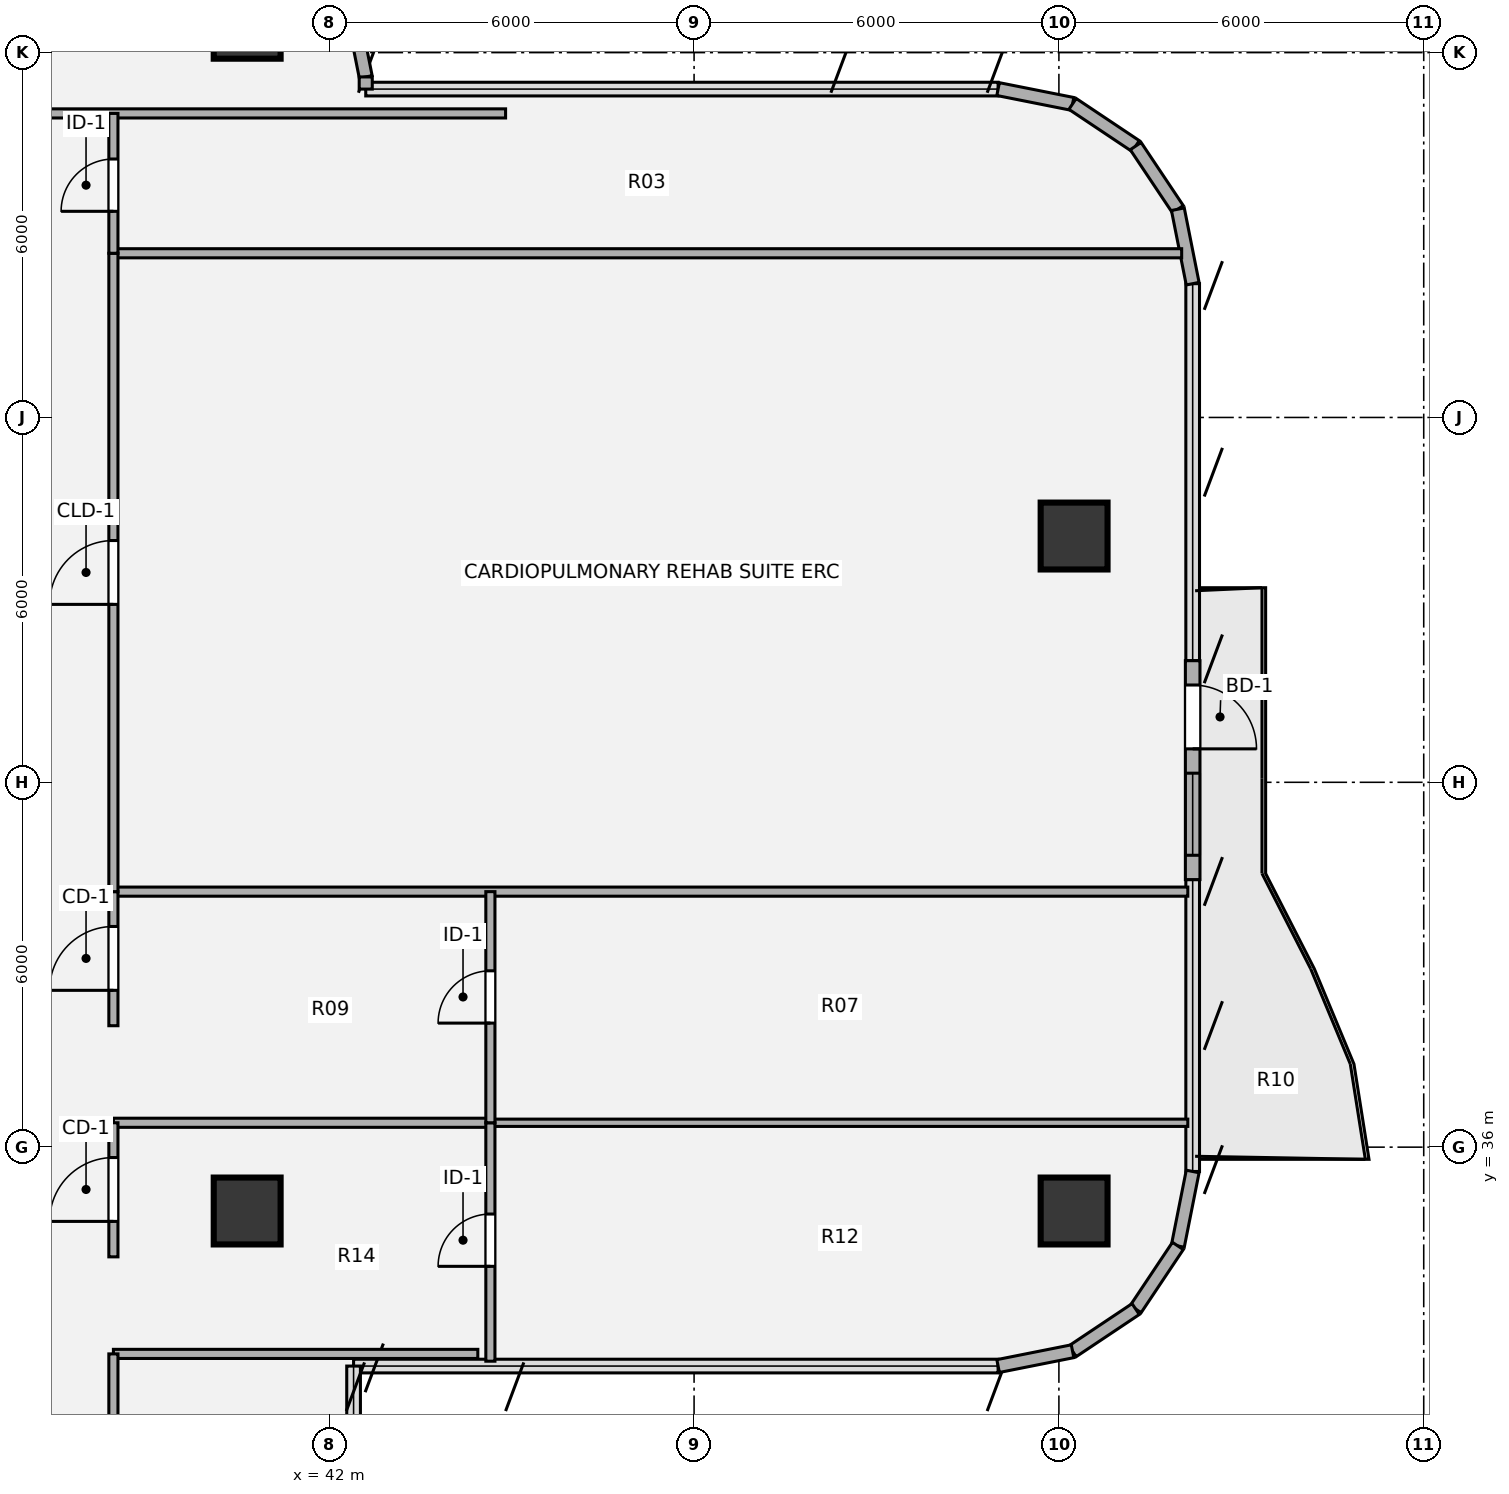
"""IFC4 building model, lengths in metres.
Left out: names, types, materials, properties, quantities, classifications, styles, units other than length and angle.
Written with IfcOpenShell. Run it as: python <this file> out.ifc"""

import sys

from ifc_helpers import new_model, si_unit, direction, frame, frame_2d, origin, origin_2d, place, context, subcontext, project, spatial, rectangle, hollow_circle, extrude, source, transform, mapped, element, fill, save


model = new_model("IFC4")
c1 = context("Model", 3, precision=1e-05, world=origin(), true_north=direction((0.0, 1.0)))
c2 = subcontext(c1, "Body", "Model", "MODEL_VIEW")
j1 = project(units=[si_unit("LENGTHUNIT", "METRE"), si_unit("PLANEANGLEUNIT", "RADIAN")], contexts=[c1])
p1 = place(None, origin())
s1 = spatial("IfcSite", under=j1, at=p1, CompositionType="ELEMENT")
p2 = place(p1, origin())
s2 = spatial("IfcBuilding", under=s1, at=p2, CompositionType="ELEMENT")
p3 = place(p2, frame((0.0, 0.0, 182.88)))
s3 = spatial("IfcBuildingStorey", under=s2, at=p3, CompositionType="ELEMENT", Elevation=182.88)
m1 = source(origin(), c2, "Body", "SweptSolid", [
    extrude(hollow_circle(Radius=0.55, WallThickness=0.04, at=origin_2d()), origin(), (0.0, 0.0, 1.0), 3.78),
])
for number, where, z_axis, x_axis in (
    (1, (54.25, 34.95, 0.0), (0.0, 0.0, 1.0), (1.0, 0.0, 0.0)),
    (2, (54.25, 46.05, 0.0), (0.0, 0.0, 1.0), (1.0, 0.0, 0.0)),
    (3, (40.65, 34.95, 0.0), (0.0, 0.0, 1.0), (1.0, 0.0, 0.0)),
    (4, (40.65, 54.45, 0.0), (0.0, 0.0, 1.0), (1.0, 0.0, 0.0)),
):
    element("IfcColumn", number, at=place(p3, frame(where, z_axis=z_axis, x_axis=x_axis)), inside=s3, PredefinedType="COLUMN", context=c2, shape_type="MappedRepresentation", body=[
        mapped(m1, transform((0.0, 0.0, 0.0), x_axis=(1.0, 0.0, 0.0), y_axis=(0.0, 1.0, 0.0), z_axis=(0.0, 0.0, 1.0), scale=1.0)),
    ])
p4 = place(p3, frame((42.387, 54.671, 0.0), z_axis=(0.0, 0.0, 1.0), x_axis=(0.195127417394, -0.980777900945, 0.0)))
e5 = element("IfcWall", 5, at=p4, inside=s3, PredefinedType="SOLIDWALL", context=c2, shape_type="SweptSolid", body=[
    extrude(rectangle(XDim=1.092, YDim=0.215, at=frame_2d((0.546, 0.0))), origin(), (0.0, 0.0, 1.0), 3.53),
])
p5 = place(p3, frame((42.6, 53.6, 0.0), z_axis=(0.0, 0.0, 1.0), x_axis=(0.0, -1.0, 0.0)))
e6 = element("IfcWall", 6, at=p5, inside=s3, PredefinedType="SOLIDWALL", context=c2, shape_type="SweptSolid", body=[
    extrude(rectangle(XDim=0.2, YDim=0.215, at=frame_2d((0.1, 0.0))), origin(), (0.0, 0.0, 1.0), 3.53),
])
for number, where, z_axis, x_axis in (
    (7, (53.0, 53.4, 0.0), (0.0, 0.0, 1.0), (0.981, -0.195, 0.0)),
    (8, (54.225, 53.156, 0.0), (0.0, 0.0, 1.0), (0.831, -0.556, 0.0)),
    (9, (55.263, 52.463, 0.0), (0.0, 0.0, 1.0), (0.556, -0.831, 0.0)),
    (10, (55.956, 51.425, 0.0), (0.0, 0.0, 1.0), (0.195, -0.981, 0.0)),
):
    element("IfcWall", number, at=place(p3, frame(where, z_axis=z_axis, x_axis=x_axis)), inside=s3, PredefinedType="SOLIDWALL", context=c2, shape_type="SweptSolid", body=[
        extrude(rectangle(XDim=1.249, YDim=0.215, at=frame_2d((0.624, 0.0))), origin(), (0.0, 0.0, 1.0), 3.53),
    ])
p6 = place(p3, frame((56.2, 44.0, 0.0), z_axis=(0.0, 0.0, 1.0), x_axis=(0.0, -1.0, 0.0)))
e11 = element("IfcWall", 11, at=p6, inside=s3, PredefinedType="SOLIDWALL", context=c2, shape_type="SweptSolid", body=[
    extrude(rectangle(XDim=3.6, YDim=0.24, at=frame_2d((1.8, 0.0))), origin(), (0.0, 0.0, 1.0), 3.53),
])
p7 = place(p6, frame((0.4, 0.0, 0.0)))
e12 = element("IfcOpeningElement", 12, at=p7, cuts=e11, PredefinedType="OPENING", context=c2, shape_type="SweptSolid", body=[
    extrude(rectangle(XDim=1.05, YDim=2.15, at=origin_2d()), frame((0.525, 0.13, 1.075), z_axis=(0.0, -1.0, 0.0), x_axis=(1.0, 0.0, 0.0)), (0.0, 0.0, 1.0), 0.26),
])
p8 = place(p6, frame((1.85, 0.0, 0.85)))
e13 = element("IfcOpeningElement", 13, at=p8, cuts=e11, PredefinedType="OPENING", context=c2, shape_type="SweptSolid", body=[
    extrude(rectangle(XDim=1.35, YDim=1.35, at=origin_2d()), frame((0.675, 0.13, 0.675), z_axis=(0.0, -1.0, 0.0), x_axis=(1.0, 0.0, 0.0)), (0.0, 0.0, 1.0), 0.26),
])
for number, where, z_axis, x_axis in (
    (14, (56.2, 35.6, 0.0), (0.0, 0.0, 1.0), (-0.195, -0.981, 0.0)),
    (15, (55.956, 34.375, 0.0), (0.0, 0.0, 1.0), (-0.556, -0.831, 0.0)),
    (16, (55.263, 33.337, 0.0), (0.0, 0.0, 1.0), (-0.831, -0.556, 0.0)),
    (17, (54.225, 32.644, 0.0), (0.0, 0.0, 1.0), (-0.981, -0.195, 0.0)),
):
    element("IfcWall", number, at=place(p3, frame(where, z_axis=z_axis, x_axis=x_axis)), inside=s3, PredefinedType="SOLIDWALL", context=c2, shape_type="SweptSolid", body=[
        extrude(rectangle(XDim=1.249, YDim=0.215, at=frame_2d((0.624, 0.0))), origin(), (0.0, 0.0, 1.0), 3.53),
    ])
p9 = place(p3, frame((38.45, 32.6, 0.0), z_axis=(0.0, 0.0, 1.0), x_axis=(1.0, 0.0, 0.0)))
e18 = element("IfcWall", 18, at=p9, inside=s3, PredefinedType="PARTITIONING", context=c2, shape_type="SweptSolid", body=[
    extrude(rectangle(XDim=5.993, YDim=0.15, at=frame_2d((2.997, 0.0))), origin(), (0.0, 0.0, 1.0), 3.5),
])
p10 = place(p3, frame((38.45, 36.401, 0.0), z_axis=(0.0, 0.0, 1.0), x_axis=(1.0, 0.0, 0.0)))
e19 = element("IfcWall", 19, at=p10, inside=s3, PredefinedType="PARTITIONING", context=c2, shape_type="SweptSolid", body=[
    extrude(rectangle(XDim=6.2, YDim=0.15, at=frame_2d((3.1, 0.0))), origin(), (0.0, 0.0, 1.0), 2.982),
])
p11 = place(p3, frame((44.65, 36.401, 0.0), z_axis=(0.0, 0.0, 1.0), x_axis=(1.0, 0.0, 0.0)))
e20 = element("IfcWall", 20, at=p11, inside=s3, PredefinedType="PARTITIONING", context=c2, shape_type="SweptSolid", body=[
    extrude(rectangle(XDim=11.47, YDim=0.12, at=frame_2d((5.735, 0.0))), origin(), (0.0, 0.0, 1.0), 2.982),
])
p12 = place(p3, frame((38.45, 40.202, 0.0), z_axis=(0.0, 0.0, 1.0), x_axis=(1.0, 0.0, 0.0)))
e21 = element("IfcWall", 21, at=p12, inside=s3, PredefinedType="PARTITIONING", context=c2, shape_type="SweptSolid", body=[
    extrude(rectangle(XDim=17.67, YDim=0.15, at=frame_2d((8.835, 0.0))), origin(), (0.0, 0.0, 1.0), 2.982),
])
p13 = place(p3, frame((38.45, 50.7, 0.0), z_axis=(0.0, 0.0, 1.0), x_axis=(1.0, 0.0, 0.0)))
e22 = element("IfcWall", 22, at=p13, inside=s3, PredefinedType="PARTITIONING", context=c2, shape_type="SweptSolid", body=[
    extrude(rectangle(XDim=17.569, YDim=0.15, at=frame_2d((8.785, 0.0))), origin(), (0.0, 0.0, 1.0), 3.308),
])
p14 = place(p3, frame((27.1, 53.0, 0.0), z_axis=(0.0, 0.0, 1.0), x_axis=(1.0, 0.0, 0.0)))
e23 = element("IfcWall", 23, at=p14, inside=s3, PredefinedType="PARTITIONING", context=c2, shape_type="SweptSolid", body=[
    extrude(rectangle(XDim=17.8, YDim=0.15, at=frame_2d((8.9, 0.0))), origin(), (0.0, 0.0, 1.0), 3.308),
])
p15 = place(p14, frame((8.375, 0.0, 0.0)))
e24 = element("IfcOpeningElement", 24, at=p15, cuts=e23, PredefinedType="OPENING", context=c2, shape_type="SweptSolid", body=[
    extrude(rectangle(XDim=1.05, YDim=2.1, at=origin_2d()), frame((0.525, 0.085, 1.05), z_axis=(0.0, -1.0, 0.0), x_axis=(1.0, 0.0, 0.0)), (0.0, 0.0, 1.0), 0.17),
])
p16 = place(p3, frame((38.45, 22.4, 0.0), z_axis=(0.0, 0.0, 1.0), x_axis=(0.0, 1.0, 0.0)))
e25 = element("IfcWall", 25, at=p16, inside=s3, PredefinedType="PARTITIONING", context=c2, shape_type="SweptSolid", body=[
    extrude(rectangle(XDim=10.2, YDim=0.15, at=frame_2d((5.1, 0.0))), origin(), (0.0, 0.0, 1.0), 3.5),
])
p17 = place(p16, frame((4.475, 0.0, 0.0)))
e26 = element("IfcOpeningElement", 26, at=p17, cuts=e25, PredefinedType="OPENING", context=c2, shape_type="SweptSolid", body=[
    extrude(rectangle(XDim=1.05, YDim=2.1, at=origin_2d()), frame((0.525, 0.085, 1.05), z_axis=(0.0, -1.0, 0.0), x_axis=(1.0, 0.0, 0.0)), (0.0, 0.0, 1.0), 0.17),
])
p18 = place(p3, frame((38.45, 34.196, 0.0), z_axis=(0.0, 0.0, 1.0), x_axis=(0.0, 1.0, 0.0)))
e27 = element("IfcWall", 27, at=p18, inside=s3, PredefinedType="PARTITIONING", context=c2, shape_type="SweptSolid", body=[
    extrude(rectangle(XDim=2.205, YDim=0.15, at=frame_2d((1.103, 0.0))), origin(), (0.0, 0.0, 1.0), 3.5),
])
p19 = place(p18, frame((0.583, 0.0, 0.0)))
e28 = element("IfcOpeningElement", 28, at=p19, cuts=e27, PredefinedType="OPENING", context=c2, shape_type="SweptSolid", body=[
    extrude(rectangle(XDim=1.05, YDim=2.1, at=origin_2d()), frame((0.525, 0.085, 1.05), z_axis=(0.0, -1.0, 0.0), x_axis=(1.0, 0.0, 0.0)), (0.0, 0.0, 1.0), 0.17),
])
p20 = place(p3, frame((38.45, 37.997, 0.0), z_axis=(0.0, 0.0, 1.0), x_axis=(0.0, 1.0, 0.0)))
e29 = element("IfcWall", 29, at=p20, inside=s3, PredefinedType="PARTITIONING", context=c2, shape_type="SweptSolid", body=[
    extrude(rectangle(XDim=2.205, YDim=0.15, at=frame_2d((1.103, 0.0))), origin(), (0.0, 0.0, 1.0), 3.5),
])
p21 = place(p20, frame((0.582, 0.0, 0.0)))
e30 = element("IfcOpeningElement", 30, at=p21, cuts=e29, PredefinedType="OPENING", context=c2, shape_type="SweptSolid", body=[
    extrude(rectangle(XDim=1.05, YDim=2.1, at=origin_2d()), frame((0.525, 0.085, 1.05), z_axis=(0.0, -1.0, 0.0), x_axis=(1.0, 0.0, 0.0)), (0.0, 0.0, 1.0), 0.17),
])
p22 = place(p3, frame((38.45, 40.202, 0.0), z_axis=(0.0, 0.0, 1.0), x_axis=(0.0, 1.0, 0.0)))
e31 = element("IfcWall", 31, at=p22, inside=s3, PredefinedType="PARTITIONING", context=c2, shape_type="SweptSolid", body=[
    extrude(rectangle(XDim=10.498, YDim=0.15, at=frame_2d((5.249, 0.0))), origin(), (0.0, 0.0, 1.0), 3.5),
])
p23 = place(p22, frame((4.724, 0.0, 0.0)))
e32 = element("IfcOpeningElement", 32, at=p23, cuts=e31, PredefinedType="OPENING", context=c2, shape_type="SweptSolid", body=[
    extrude(rectangle(XDim=1.05, YDim=2.1, at=origin_2d()), frame((0.525, 0.085, 1.05), z_axis=(0.0, -1.0, 0.0), x_axis=(1.0, 0.0, 0.0)), (0.0, 0.0, 1.0), 0.17),
])
p24 = place(p3, frame((38.45, 50.7, 0.0), z_axis=(0.0, 0.0, 1.0), x_axis=(0.0, 1.0, 0.0)))
e33 = element("IfcWall", 33, at=p24, inside=s3, PredefinedType="PARTITIONING", context=c2, shape_type="SweptSolid", body=[
    extrude(rectangle(XDim=2.3, YDim=0.15, at=frame_2d((1.15, 0.0))), origin(), (0.0, 0.0, 1.0), 3.5),
])
p25 = place(p24, frame((0.69, 0.0, 0.0)))
e34 = element("IfcOpeningElement", 34, at=p25, cuts=e33, PredefinedType="OPENING", context=c2, shape_type="SweptSolid", body=[
    extrude(rectangle(XDim=0.86, YDim=2.1, at=origin_2d()), frame((0.43, 0.085, 1.05), z_axis=(0.0, -1.0, 0.0), x_axis=(1.0, 0.0, 0.0)), (0.0, 0.0, 1.0), 0.17),
])
p26 = place(p3, frame((44.65, 32.48, 0.0), z_axis=(0.0, 0.0, 1.0), x_axis=(0.0, 1.0, 0.0)))
e35 = element("IfcWall", 35, at=p26, inside=s3, PredefinedType="PARTITIONING", context=c2, shape_type="SweptSolid", body=[
    extrude(rectangle(XDim=3.921, YDim=0.15, at=frame_2d((1.96, 0.0))), origin(), (0.0, 0.0, 1.0), 3.5),
])
p27 = place(p26, frame((1.56, 0.0, 0.0)))
e36 = element("IfcOpeningElement", 36, at=p27, cuts=e35, PredefinedType="OPENING", context=c2, shape_type="SweptSolid", body=[
    extrude(rectangle(XDim=0.86, YDim=2.1, at=origin_2d()), frame((0.43, 0.085, 1.05), z_axis=(0.0, -1.0, 0.0), x_axis=(1.0, 0.0, 0.0)), (0.0, 0.0, 1.0), 0.17),
])
p28 = place(p3, frame((44.65, 36.401, 0.0), z_axis=(0.0, 0.0, 1.0), x_axis=(0.0, 1.0, 0.0)))
e37 = element("IfcWall", 37, at=p28, inside=s3, PredefinedType="PARTITIONING", context=c2, shape_type="SweptSolid", body=[
    extrude(rectangle(XDim=3.801, YDim=0.15, at=frame_2d((1.9, 0.0))), origin(), (0.0, 0.0, 1.0), 3.5),
])
p29 = place(p28, frame((1.639, 0.0, 0.0)))
e38 = element("IfcOpeningElement", 38, at=p29, cuts=e37, PredefinedType="OPENING", context=c2, shape_type="SweptSolid", body=[
    extrude(rectangle(XDim=0.86, YDim=2.1, at=origin_2d()), frame((0.43, 0.085, 1.05), z_axis=(0.0, -1.0, 0.0), x_axis=(1.0, 0.0, 0.0)), (0.0, 0.0, 1.0), 0.17),
])
m2 = source(origin(), c2, "Body", "SweptSolid", [
    extrude(rectangle(XDim=1.05, YDim=2.15, at=origin_2d()), frame((0.525, 0.025, 1.075), z_axis=(0.0, -1.0, 0.0), x_axis=(1.0, 0.0, 0.0)), (0.0, 0.0, 1.0), 0.05),
])
p30 = place(p7, origin())
e39 = element("IfcDoor", 39, at=p30, inside=s3, OperationType="SINGLE_SWING_RIGHT", PredefinedType="DOOR", context=c2, shape_type="MappedRepresentation", body=[
    mapped(m2, transform((0.0, 0.0, 0.0), x_axis=(1.0, 0.0, 0.0), y_axis=(0.0, 1.0, 0.0), z_axis=(0.0, 0.0, 1.0), scale=1.0)),
])
fill(e12, e39)
m3 = source(origin(), c2, "Body", "SweptSolid", [
    extrude(rectangle(XDim=1.35, YDim=1.35, at=origin_2d()), frame((0.675, 0.03, 0.675), z_axis=(0.0, -1.0, 0.0), x_axis=(1.0, 0.0, 0.0)), (0.0, 0.0, 1.0), 0.06),
])
p31 = place(p8, origin())
e40 = element("IfcWindow", 40, at=p31, inside=s3, PartitioningType="SINGLE_PANEL", PredefinedType="WINDOW", context=c2, shape_type="MappedRepresentation", body=[
    mapped(m3, transform((0.0, 0.0, 0.0), x_axis=(1.0, 0.0, 0.0), y_axis=(0.0, 1.0, 0.0), z_axis=(0.0, 0.0, 1.0), scale=1.0)),
])
fill(e13, e40)
m4 = source(origin(), c2, "Body", "SweptSolid", [
    extrude(rectangle(XDim=1.05, YDim=2.1, at=origin_2d()), frame((0.525, 0.025, 1.05), z_axis=(0.0, -1.0, 0.0), x_axis=(1.0, 0.0, 0.0)), (0.0, 0.0, 1.0), 0.05),
])
p32 = place(p19, origin())
e41 = element("IfcDoor", 41, at=p32, inside=s3, OperationType="SINGLE_SWING_LEFT", PredefinedType="DOOR", context=c2, shape_type="MappedRepresentation", body=[
    mapped(m4, transform((0.0, 0.0, 0.0), x_axis=(1.0, 0.0, 0.0), y_axis=(0.0, 1.0, 0.0), z_axis=(0.0, 0.0, 1.0), scale=1.0)),
])
fill(e28, e41)
p33 = place(p21, origin())
e42 = element("IfcDoor", 42, at=p33, inside=s3, OperationType="SINGLE_SWING_LEFT", PredefinedType="DOOR", context=c2, shape_type="MappedRepresentation", body=[
    mapped(m4, transform((0.0, 0.0, 0.0), x_axis=(1.0, 0.0, 0.0), y_axis=(0.0, 1.0, 0.0), z_axis=(0.0, 0.0, 1.0), scale=1.0)),
])
fill(e30, e42)
m5 = source(origin(), c2, "Body", "SweptSolid", [
    extrude(rectangle(XDim=1.05, YDim=2.1, at=origin_2d()), frame((0.525, 0.025, 1.05), z_axis=(0.0, -1.0, 0.0), x_axis=(1.0, 0.0, 0.0)), (0.0, 0.0, 1.0), 0.05),
])
p34 = place(p23, origin())
e43 = element("IfcDoor", 43, at=p34, inside=s3, OperationType="SINGLE_SWING_LEFT", PredefinedType="DOOR", context=c2, shape_type="MappedRepresentation", body=[
    mapped(m5, transform((0.0, 0.0, 0.0), x_axis=(1.0, 0.0, 0.0), y_axis=(0.0, 1.0, 0.0), z_axis=(0.0, 0.0, 1.0), scale=1.0)),
])
fill(e32, e43)
m6 = source(origin(), c2, "Body", "SweptSolid", [
    extrude(rectangle(XDim=0.86, YDim=2.1, at=origin_2d()), frame((0.43, 0.025, 1.05), z_axis=(0.0, -1.0, 0.0), x_axis=(1.0, 0.0, 0.0)), (0.0, 0.0, 1.0), 0.05),
])
p35 = place(p25, origin())
e44 = element("IfcDoor", 44, at=p35, inside=s3, OperationType="SINGLE_SWING_LEFT", PredefinedType="DOOR", context=c2, shape_type="MappedRepresentation", body=[
    mapped(m6, transform((0.0, 0.0, 0.0), x_axis=(1.0, 0.0, 0.0), y_axis=(0.0, 1.0, 0.0), z_axis=(0.0, 0.0, 1.0), scale=1.0)),
])
fill(e34, e44)
p36 = place(p27, origin())
e45 = element("IfcDoor", 45, at=p36, inside=s3, OperationType="SINGLE_SWING_LEFT", PredefinedType="DOOR", context=c2, shape_type="MappedRepresentation", body=[
    mapped(m6, transform((0.0, 0.0, 0.0), x_axis=(1.0, 0.0, 0.0), y_axis=(0.0, 1.0, 0.0), z_axis=(0.0, 0.0, 1.0), scale=1.0)),
])
fill(e36, e45)
p37 = place(p29, origin())
e46 = element("IfcDoor", 46, at=p37, inside=s3, OperationType="SINGLE_SWING_LEFT", PredefinedType="DOOR", context=c2, shape_type="MappedRepresentation", body=[
    mapped(m6, transform((0.0, 0.0, 0.0), x_axis=(1.0, 0.0, 0.0), y_axis=(0.0, 1.0, 0.0), z_axis=(0.0, 0.0, 1.0), scale=1.0)),
])
fill(e38, e46)
save(model, sys.argv[1])
